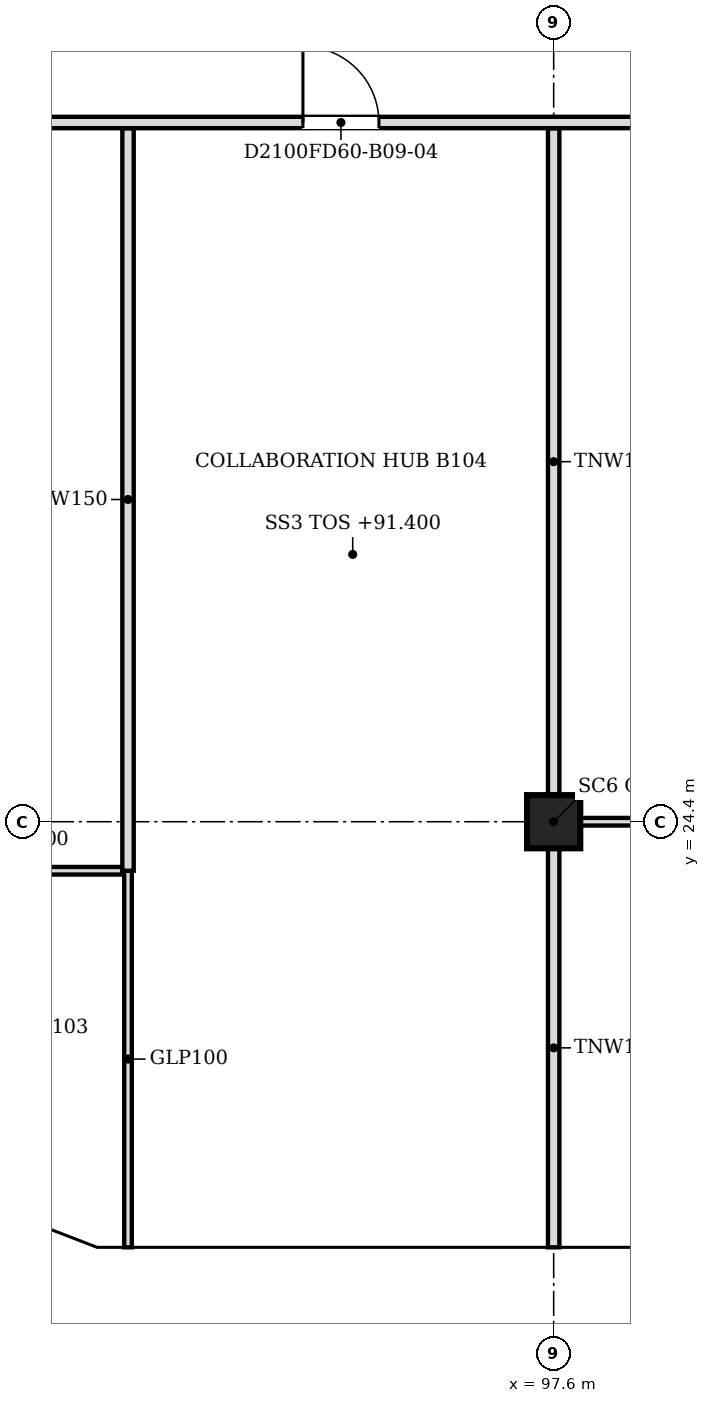
"""IFC4 building model, lengths in metres.
Left out: names, types, materials, properties, quantities, classifications, styles, units other than length and angle.
Written with IfcOpenShell. Run it as: python <this file> out.ifc"""

import sys

from ifc_helpers import new_model, si_unit, direction, frame, frame_2d, origin, origin_2d, place, context, subcontext, project, spatial, polyline, rectangle, outline, extrude, faceted_brep, source, transform, mapped, element, fill, save


model = new_model("IFC4")
c1 = context("Model", 3, precision=1e-05, world=origin(), true_north=direction((0.0, 1.0)))
c2 = subcontext(c1, "Body", "Model", "MODEL_VIEW")
j1 = project(units=[si_unit("LENGTHUNIT", "METRE"), si_unit("PLANEANGLEUNIT", "RADIAN")], contexts=[c1])
p1 = place(None, origin())
s1 = spatial("IfcSite", under=j1, at=p1, CompositionType="ELEMENT")
p2 = place(p1, origin())
s2 = spatial("IfcBuilding", under=s1, at=p2, CompositionType="ELEMENT")
p3 = place(p2, frame((0.0, 0.0, 91.4)))
s3 = spatial("IfcBuildingStorey", under=s2, at=p3, CompositionType="ELEMENT", Elevation=91.4)
p4 = place(p3, frame((97.6, 24.4, 0.0), z_axis=(0.0, 0.0, 1.0), x_axis=(1.0, 0.0, 0.0)))
e1 = element("IfcColumn", 1, at=p4, inside=s3, PredefinedType="COLUMN", context=c2, shape_type="SweptSolid", body=[
    extrude(rectangle(XDim=0.7, YDim=0.7, at=origin_2d()), origin(), (0.0, 0.0, 1.0), 3.6),
])
m1 = source(origin(), c2, "Body", "Brep", [
    faceted_brep([(0.047, -0.25, 0.0), (3.05, -0.25, 3.8), (0.047, -0.25, 7.6), (0.0, -0.25, 7.54), (0.0, -0.25, 0.06), (0.093, 0.25, 7.541), (3.05, 0.25, 3.8), (0.093, 0.25, 0.059), (0.047, 0.0, 0.0), (0.047, 0.0, 7.6)], [[[0, 1, 2, 3, 4]], [[5, 6, 7]], [[7, 6, 1, 0, 8]], [[6, 5, 9, 2, 1]], [[3, 2, 9]], [[8, 0, 4]], [[7, 8, 4, 3, 9, 5]]]),
])
p5 = place(p3, frame((91.5, 18.55, -3.8), z_axis=(0.0, 0.0, 1.0), x_axis=(1.0, 0.0, 0.0)))
e2 = element("IfcWall", 2, at=p5, inside=s3, PredefinedType="SOLIDWALL", context=c2, shape_type="MappedRepresentation", body=[
    mapped(m1, transform((0.0, 0.0, 0.0), scale=1.0)),
])
m2 = source(origin(), c2, "Body", "SweptSolid", [
    extrude(outline(polyline([(0.247, 0.656), (2.731, 3.8), (0.247, 6.944), (0.247, 0.656)])), frame((0.0, 0.26, 0.0), z_axis=(0.0, -1.0, 0.0), x_axis=(1.0, 0.0, 0.0)), (0.0, 0.0, 1.0), 0.52),
])
p6 = place(p5, origin())
e3 = element("IfcOpeningElement", 3, at=p6, cuts=e2, PredefinedType="OPENING", context=c2, shape_type="MappedRepresentation", body=[
    mapped(m2, transform((0.0, 0.0, 0.0), scale=1.0)),
])
m3 = source(origin(), c2, "Body", "Brep", [
    faceted_brep([(2.95, -0.25, 0.0), (2.997, -0.25, 0.059), (2.997, -0.25, 7.541), (2.95, -0.25, 7.6), (0.0, -0.25, 3.8), (0.053, 0.25, 3.868), (2.904, 0.25, 7.54), (2.904, 0.25, 0.06), (0.053, 0.25, 3.732), (2.95, 0.0, 0.0), (2.95, 0.0, 7.6), (0.0, 0.0, 3.8)], [[[0, 1, 2, 3, 4]], [[5, 6, 7, 8]], [[1, 0, 9]], [[10, 3, 2]], [[6, 5, 11, 4, 3, 10]], [[8, 7, 9, 0, 4, 11]], [[8, 11, 5]], [[1, 9, 7, 6, 10, 2]]]),
])
p7 = place(p3, frame((88.794, 19.612, -3.8), z_axis=(0.0, 0.0, 1.0), x_axis=(0.933000876937, -0.359874094142, 0.0)))
e4 = element("IfcWall", 4, at=p7, inside=s3, PredefinedType="SOLIDWALL", context=c2, shape_type="MappedRepresentation", body=[
    mapped(m3, transform((0.0, 0.0, 0.0), scale=1.0)),
])
m4 = source(origin(), c2, "Body", "SweptSolid", [
    extrude(outline(polyline([(2.75, 6.935), (0.316, 3.8), (2.75, 0.665), (2.75, 6.935)])), frame((0.0, 0.26, 0.0), z_axis=(0.0, -1.0, 0.0), x_axis=(1.0, 0.0, 0.0)), (0.0, 0.0, 1.0), 0.52),
])
p8 = place(p7, origin())
e5 = element("IfcOpeningElement", 5, at=p8, cuts=e4, PredefinedType="OPENING", context=c2, shape_type="MappedRepresentation", body=[
    mapped(m4, transform((0.0, 0.0, 0.0), scale=1.0)),
])
m5 = source(origin(), c2, "Body", "Brep", [
    faceted_brep([(3.05, -0.25, 0.0), (6.1, -0.25, 3.8), (6.1, -0.25, 3.8), (3.05, -0.25, 7.6), (0.0, -0.25, 3.8), (0.0, 0.25, 3.8), (3.05, 0.25, 7.6), (6.1, 0.25, 3.8), (6.1, 0.25, 3.8), (3.05, 0.25, 0.0)], [[[0, 1, 2, 3, 4]], [[5, 6, 7, 8, 9]], [[9, 8, 1, 0]], [[7, 6, 3, 2]], [[6, 5, 4, 3]], [[5, 9, 0, 4]], [[1, 8, 7, 2]]]),
])
p9 = place(p3, frame((94.55, 18.55, -3.8), z_axis=(0.0, 0.0, 1.0), x_axis=(1.0, 0.0, 0.0)))
e6 = element("IfcWall", 6, at=p9, inside=s3, PredefinedType="SOLIDWALL", context=c2, shape_type="MappedRepresentation", body=[
    mapped(m5, transform((0.0, 0.0, 0.0), scale=1.0)),
])
m6 = source(origin(), c2, "Body", "SweptSolid", [
    extrude(outline(polyline([(3.05, 0.399), (5.78, 3.8), (3.05, 7.2), (0.321, 3.8), (3.05, 0.399)])), frame((0.0, 0.26, 0.0), z_axis=(0.0, -1.0, 0.0), x_axis=(1.0, 0.0, 0.0)), (0.0, 0.0, 1.0), 0.52),
])
p10 = place(p9, origin())
e7 = element("IfcOpeningElement", 7, at=p10, cuts=e6, PredefinedType="OPENING", context=c2, shape_type="MappedRepresentation", body=[
    mapped(m6, transform((0.0, 0.0, 0.0), scale=1.0)),
])
m7 = source(origin(), c2, "Body", "Brep", [
    faceted_brep([(3.003, -0.25, 0.0), (6.053, -0.25, 3.8), (0.0, -0.25, 3.8), (0.047, 0.25, 3.8), (6.053, 0.25, 3.8), (3.003, 0.25, 0.0), (0.047, 0.25, 3.741), (0.0, 0.0, 3.8)], [[[0, 1, 2]], [[3, 4, 5, 6]], [[5, 4, 1, 0]], [[4, 3, 7, 2, 1]], [[6, 5, 0, 2, 7]], [[6, 7, 3]]]),
])
p11 = place(p3, frame((91.547, 18.55, 0.0), z_axis=(0.0, 0.0, 1.0), x_axis=(1.0, 0.0, 0.0)))
e8 = element("IfcWall", 8, at=p11, inside=s3, PredefinedType="SOLIDWALL", context=c2, shape_type="MappedRepresentation", body=[
    mapped(m7, transform((0.0, 0.0, 0.0), scale=1.0)),
])
m8 = source(origin(), c2, "Body", "SweptSolid", [
    extrude(outline(polyline([(3.005, 0.401), (5.532, 3.55), (0.516, 3.55), (3.005, 0.401)])), frame((0.0, 0.26, 0.0), z_axis=(0.0, -1.0, 0.0), x_axis=(1.0, 0.0, 0.0)), (0.0, 0.0, 1.0), 0.52),
])
p12 = place(p11, origin())
e9 = element("IfcOpeningElement", 9, at=p12, cuts=e8, PredefinedType="OPENING", context=c2, shape_type="MappedRepresentation", body=[
    mapped(m8, transform((0.0, 0.0, 0.0), scale=1.0)),
])
m9 = source(origin(), c2, "Body", "Brep", [
    faceted_brep([(3.05, -0.25, 0.0), (6.1, -0.25, 3.8), (6.1, -0.25, 3.8), (0.0, -0.25, 3.8), (0.0, 0.25, 3.8), (6.1, 0.25, 3.8), (6.1, 0.25, 3.8), (3.05, 0.25, 0.0)], [[[0, 1, 2, 3]], [[4, 5, 6, 7]], [[7, 6, 1, 0]], [[5, 4, 3, 2]], [[4, 7, 0, 3]], [[1, 6, 5, 2]]]),
])
p13 = place(p3, frame((97.6, 18.55, 0.0), z_axis=(0.0, 0.0, 1.0), x_axis=(1.0, 0.0, 0.0)))
e10 = element("IfcWall", 10, at=p13, inside=s3, PredefinedType="SOLIDWALL", context=c2, shape_type="MappedRepresentation", body=[
    mapped(m9, transform((0.0, 0.0, 0.0), scale=1.0)),
])
m10 = source(origin(), c2, "Body", "SweptSolid", [
    extrude(outline(polyline([(3.05, 0.399), (5.579, 3.55), (0.521, 3.55), (3.05, 0.399)])), frame((0.0, 0.26, 0.0), z_axis=(0.0, -1.0, 0.0), x_axis=(1.0, 0.0, 0.0)), (0.0, 0.0, 1.0), 0.52),
])
p14 = place(p13, origin())
e11 = element("IfcOpeningElement", 11, at=p14, cuts=e10, PredefinedType="OPENING", context=c2, shape_type="MappedRepresentation", body=[
    mapped(m10, transform((0.0, 0.0, 0.0), scale=1.0)),
])
m11 = source(origin(), c2, "Body", "Brep", [
    faceted_brep([(0.053, -0.25, 0.0), (3.003, -0.25, 3.8), (0.0, -0.25, 3.8), (0.0, -0.25, 0.068), (0.106, 0.25, 3.8), (2.957, 0.25, 3.8), (2.957, 0.25, 3.74), (0.106, 0.25, 0.068), (3.003, 0.0, 3.8), (0.053, 0.0, 0.0)], [[[0, 1, 2, 3]], [[4, 5, 6, 7]], [[7, 6, 8, 1, 0, 9]], [[5, 4, 2, 1, 8]], [[9, 0, 3]], [[7, 9, 3, 2, 4]], [[6, 5, 8]]]),
])
p15 = place(p3, frame((88.744, 19.631, 0.0), z_axis=(0.0, 0.0, 1.0), x_axis=(0.932997369089, -0.359883188373, 0.0)))
e12 = element("IfcWall", 12, at=p15, inside=s3, PredefinedType="SOLIDWALL", context=c2, shape_type="MappedRepresentation", body=[
    mapped(m11, transform((0.0, 0.0, 0.0), scale=1.0)),
])
m12 = source(origin(), c2, "Body", "SweptSolid", [
    extrude(outline(polyline([(0.253, 0.665), (2.493, 3.55), (0.253, 3.55), (0.253, 0.665)])), frame((0.0, 0.26, 0.0), z_axis=(0.0, -1.0, 0.0), x_axis=(1.0, 0.0, 0.0)), (0.0, 0.0, 1.0), 0.52),
])
p16 = place(p15, origin())
e13 = element("IfcOpeningElement", 13, at=p16, cuts=e12, PredefinedType="OPENING", context=c2, shape_type="MappedRepresentation", body=[
    mapped(m12, transform((0.0, 0.0, 0.0), scale=1.0)),
])
p17 = place(p3, frame((92.0, 18.8, 0.0), z_axis=(0.0, 0.0, 1.0), x_axis=(0.0, 1.0, 0.0)))
e14 = element("IfcWall", 14, at=p17, inside=s3, PredefinedType="PARTITIONING", context=c2, shape_type="SweptSolid", body=[
    extrude(rectangle(XDim=4.954, YDim=0.1, at=frame_2d((2.477, 0.0))), origin(), (0.0, 0.0, 1.0), 2.895),
])
p18 = place(p3, frame((97.6, 18.8, 0.0), z_axis=(0.0, 0.0, 1.0), x_axis=(0.0, 1.0, 0.0)))
e15 = element("IfcWall", 15, at=p18, inside=s3, PredefinedType="PARTITIONING", context=c2, shape_type="SweptSolid", body=[
    extrude(rectangle(XDim=5.249, YDim=0.15, at=frame_2d((2.625, 0.0))), origin(), (0.0, 0.0, 1.0), 2.895),
])
p19 = place(p3, frame((91.924, 23.755, 0.0), z_axis=(0.0, 0.0, 1.0), x_axis=(-1.0, 0.0, 0.0)))
e16 = element("IfcWall", 16, at=p19, inside=s3, PredefinedType="PARTITIONING", context=c2, shape_type="SweptSolid", body=[
    extrude(rectangle(XDim=5.739, YDim=0.1, at=frame_2d((2.87, 0.0))), origin(), (0.0, 0.0, 1.0), 2.895),
])
m13 = source(origin(), c2, "Body", "SweptSolid", [
    extrude(rectangle(XDim=0.9, YDim=2.1, at=frame_2d((0.45, 1.05))), frame((0.0, 0.06, 0.0), z_axis=(0.0, -1.0, 0.0), x_axis=(1.0, 0.0, 0.0)), (0.0, 0.0, 1.0), 0.12),
])
p20 = place(p19, frame((2.439, 0.0, 0.0)))
e17 = element("IfcOpeningElement", 17, at=p20, cuts=e16, PredefinedType="OPENING", context=c2, shape_type="MappedRepresentation", body=[
    mapped(m13, transform((0.0, 0.0, 0.0), scale=1.0)),
])
p21 = place(p3, frame((92.0, 23.755, 0.0), z_axis=(0.0, 0.0, 1.0), x_axis=(0.0, 1.0, 0.0)))
e18 = element("IfcWall", 18, at=p21, inside=s3, PredefinedType="PARTITIONING", context=c2, shape_type="SweptSolid", body=[
    extrude(rectangle(XDim=9.769, YDim=0.15, at=frame_2d((4.885, 0.0))), origin(), (0.0, 0.0, 1.0), 2.895),
])
p22 = place(p3, frame((104.124, 24.4, 0.0), z_axis=(0.0, 0.0, 1.0), x_axis=(-1.0, 0.0, 0.0)))
e19 = element("IfcWall", 19, at=p22, inside=s3, PredefinedType="PARTITIONING", context=c2, shape_type="SweptSolid", body=[
    extrude(rectangle(XDim=6.173, YDim=0.1, at=frame_2d((3.086, 0.0))), origin(), (0.0, 0.0, 1.0), 2.895),
])
p23 = place(p22, frame((2.673, 0.0, 0.0)))
e20 = element("IfcOpeningElement", 20, at=p23, cuts=e19, PredefinedType="OPENING", context=c2, shape_type="MappedRepresentation", body=[
    mapped(m13, transform((0.0, 0.0, 0.0), scale=1.0)),
])
p24 = place(p3, frame((97.6, 24.751, 0.0), z_axis=(0.0, 0.0, 1.0), x_axis=(0.0, 1.0, 0.0)))
e21 = element("IfcWall", 21, at=p24, inside=s3, PredefinedType="PARTITIONING", context=c2, shape_type="SweptSolid", body=[
    extrude(rectangle(XDim=8.773, YDim=0.15, at=frame_2d((4.386, 0.0))), origin(), (0.0, 0.0, 1.0), 2.895),
])
p25 = place(p3, frame((133.7, 33.6, 0.0), z_axis=(0.0, 0.0, 1.0), x_axis=(-1.0, 0.0, 0.0)))
e22 = element("IfcWall", 22, at=p25, inside=s3, PredefinedType="PARTITIONING", context=c2, shape_type="SweptSolid", body=[
    extrude(rectangle(XDim=47.8, YDim=0.15, at=frame_2d((23.9, 0.0))), origin(), (0.0, 0.0, 1.0), 2.895),
])
m14 = source(origin(), c2, "Body", "SweptSolid", [
    extrude(rectangle(XDim=0.9, YDim=2.1, at=frame_2d((0.45, 1.05))), frame((0.0, 0.085, 0.0), z_axis=(0.0, -1.0, 0.0), x_axis=(1.0, 0.0, 0.0)), (0.0, 0.0, 1.0), 0.17),
])
p26 = place(p25, frame((2.099, 0.0, 0.0)))
e23 = element("IfcOpeningElement", 23, at=p26, cuts=e22, PredefinedType="OPENING", context=c2, shape_type="MappedRepresentation", body=[
    mapped(m14, transform((0.0, 0.0, 0.0), scale=1.0)),
])
m15 = source(origin(), c2, "Body", "SweptSolid", [
    extrude(rectangle(XDim=1.0, YDim=2.1, at=frame_2d((0.5, 1.05))), frame((0.0, 0.085, 0.0), z_axis=(0.0, -1.0, 0.0), x_axis=(1.0, 0.0, 0.0)), (0.0, 0.0, 1.0), 0.17),
])
p27 = place(p25, frame((38.399, 0.0, 0.0)))
e24 = element("IfcOpeningElement", 24, at=p27, cuts=e22, PredefinedType="OPENING", context=c2, shape_type="MappedRepresentation", body=[
    mapped(m15, transform((0.0, 0.0, 0.0), scale=1.0)),
])
p28 = place(p25, frame((44.3, 0.0, 0.0)))
e25 = element("IfcOpeningElement", 25, at=p28, cuts=e22, PredefinedType="OPENING", context=c2, shape_type="MappedRepresentation", body=[
    mapped(m14, transform((0.0, 0.0, 0.0), scale=1.0)),
])
p29 = place(p25, frame((32.4, 0.0, 0.0)))
e26 = element("IfcOpeningElement", 26, at=p29, cuts=e22, PredefinedType="OPENING", context=c2, shape_type="MappedRepresentation", body=[
    mapped(m14, transform((0.0, 0.0, 0.0), scale=1.0)),
])
p30 = place(p25, frame((10.799, 0.0, 0.0)))
e27 = element("IfcOpeningElement", 27, at=p30, cuts=e22, PredefinedType="OPENING", context=c2, shape_type="MappedRepresentation", body=[
    mapped(m14, transform((0.0, 0.0, 0.0), scale=1.0)),
])
p31 = place(p25, frame((23.0, 0.0, 0.0)))
e28 = element("IfcOpeningElement", 28, at=p31, cuts=e22, PredefinedType="OPENING", context=c2, shape_type="MappedRepresentation", body=[
    mapped(m14, transform((0.0, 0.0, 0.0), scale=1.0)),
])
m16 = source(origin(), c2, "Body", "SweptSolid", [
    extrude(rectangle(XDim=1.0, YDim=2.1, at=frame_2d((0.5, 1.05))), frame((0.0, 0.025, 0.0), z_axis=(0.0, -1.0, 0.0), x_axis=(1.0, 0.0, 0.0)), (0.0, 0.0, 1.0), 0.05),
])
p32 = place(p27, origin())
e29 = element("IfcDoor", 29, at=p32, inside=s3, OperationType="SINGLE_SWING_RIGHT", PredefinedType="DOOR", context=c2, shape_type="MappedRepresentation", body=[
    mapped(m16, transform((0.0, 0.0, 0.0), scale=1.0)),
])
fill(e24, e29)
save(model, sys.argv[1])
